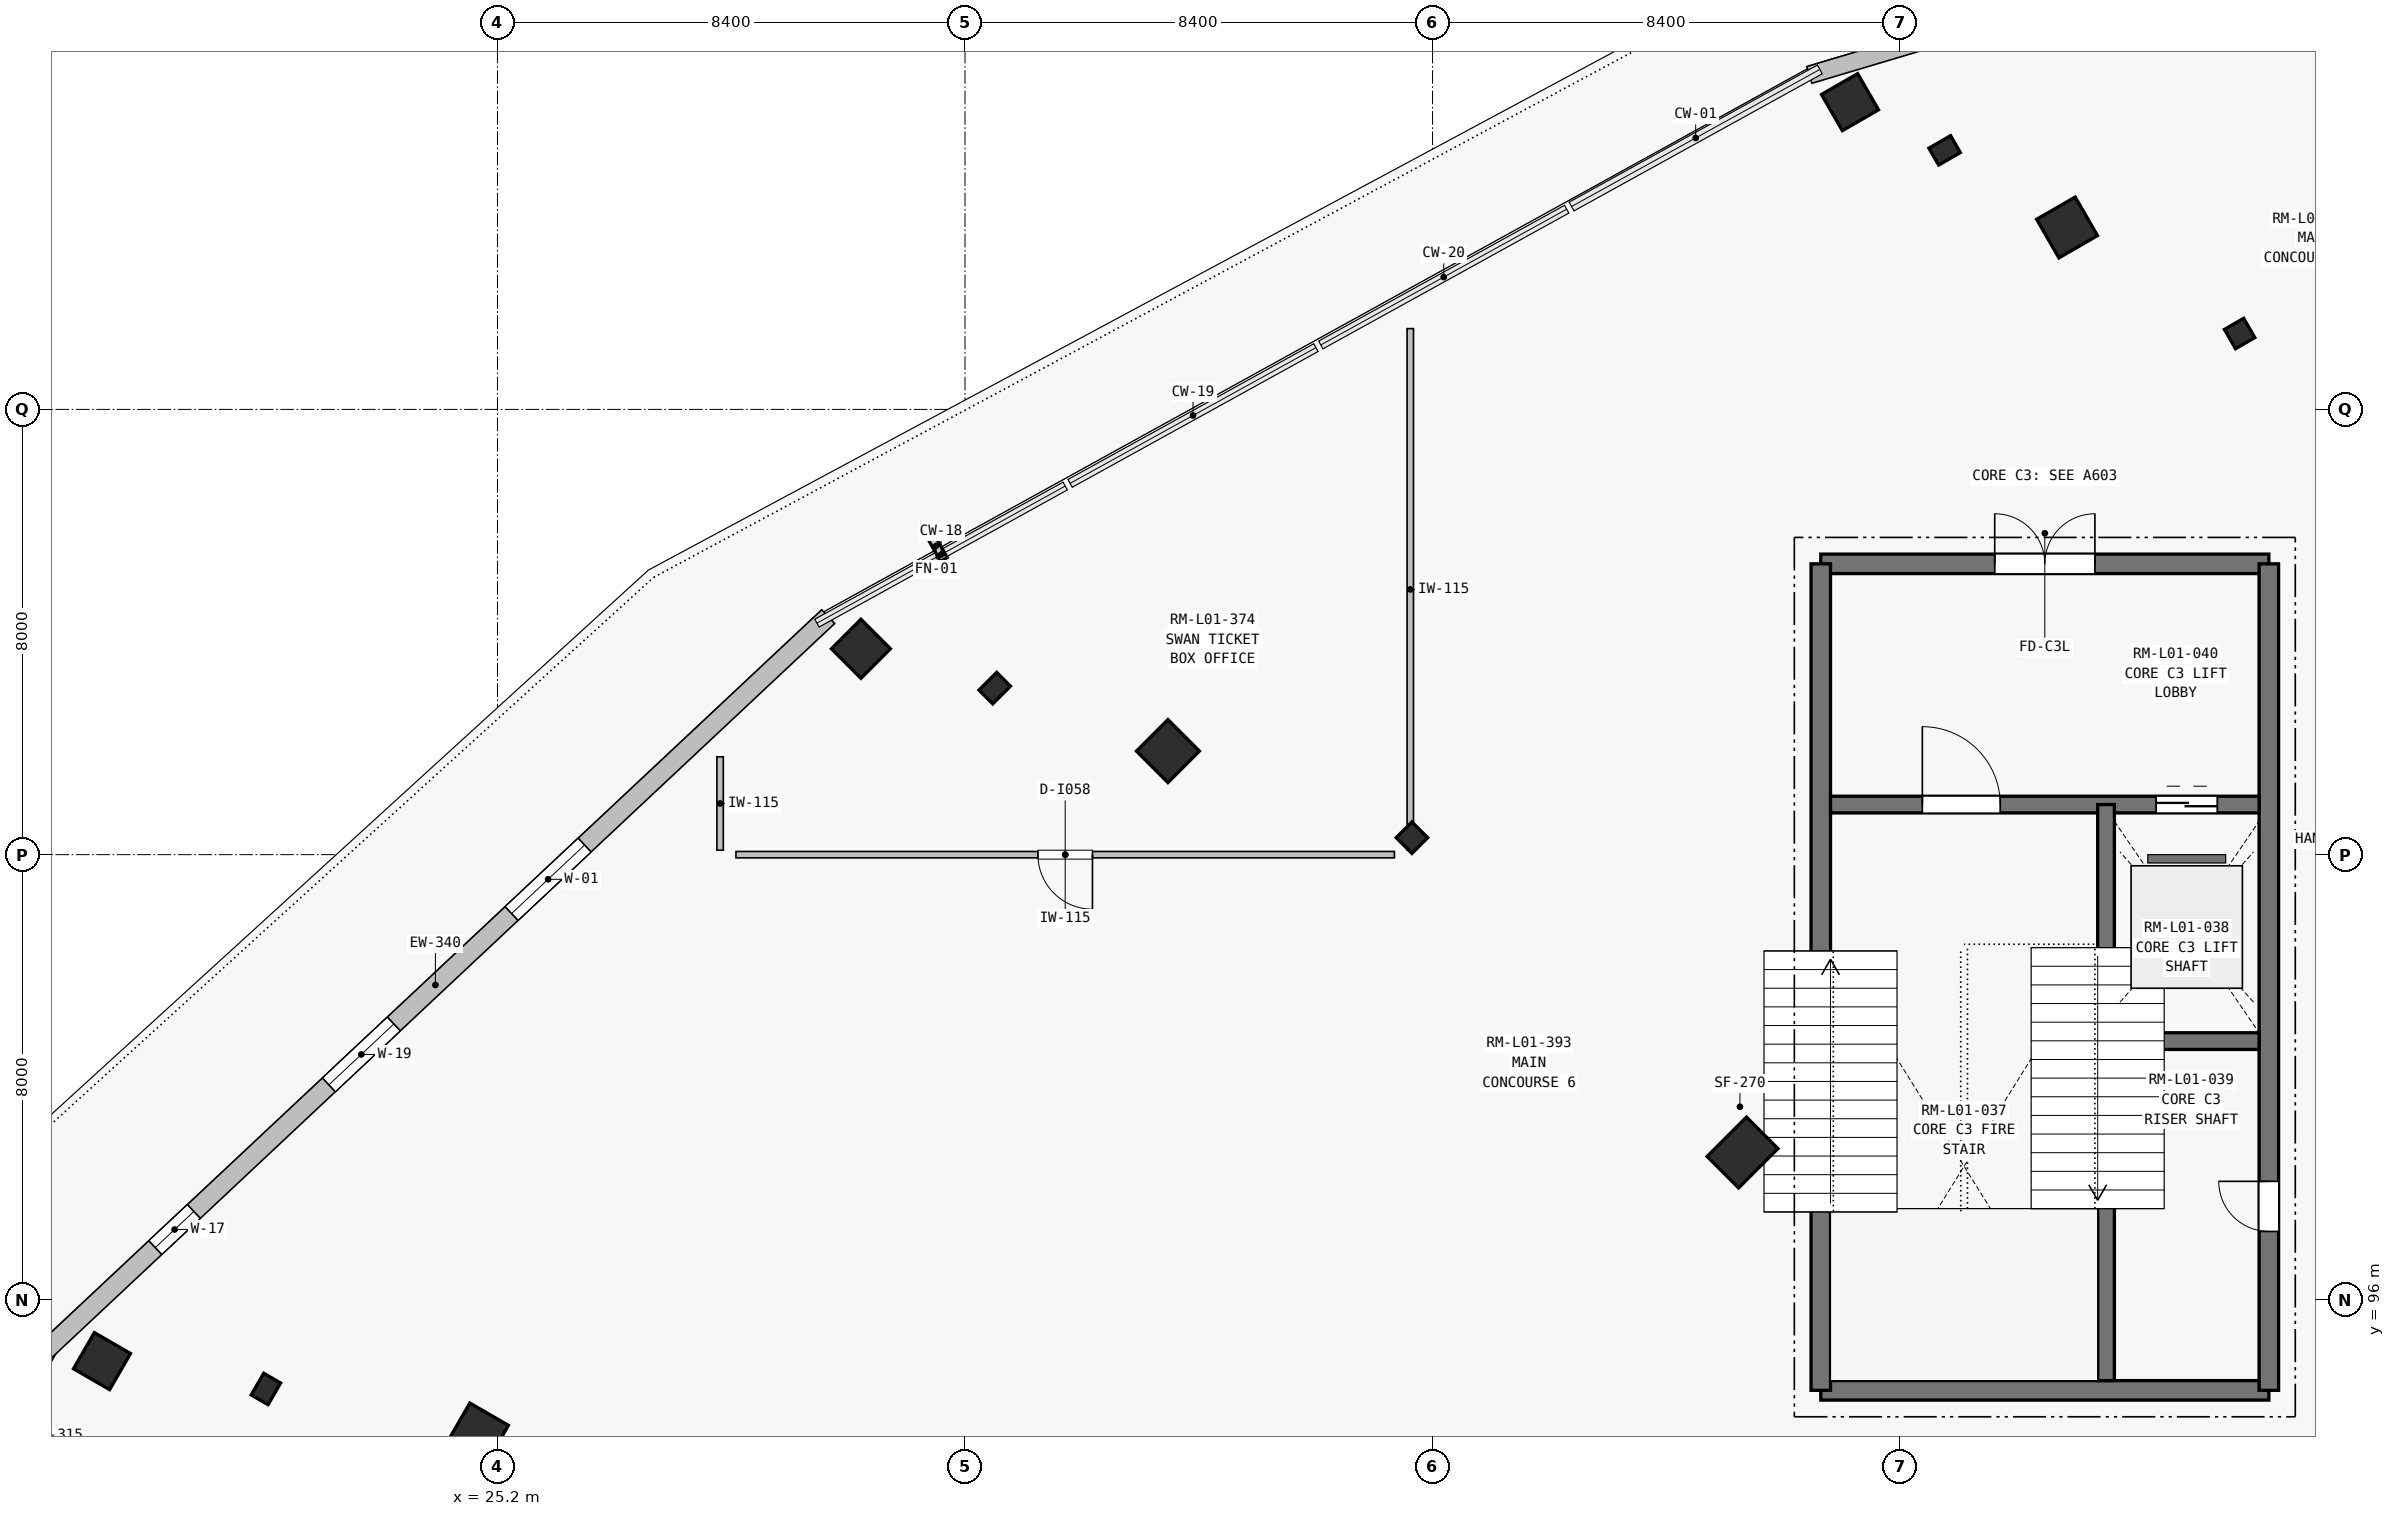
"""IFC4 building model, lengths in metres.
Left out: names, types, materials, properties, quantities, classifications, styles, units other than length and angle.
Written with IfcOpenShell. Run it as: python <this file> out.ifc"""

import sys

from ifc_helpers import new_model, si_unit, direction, frame, frame_2d, origin, origin_2d, place, context, subcontext, project, spatial, rectangle, i_section, extrude, element, fill, save


model = new_model("IFC4")
c1 = context("Model", 3, precision=1e-05, world=origin(), true_north=direction((0.0, 1.0)))
c2 = subcontext(c1, "Body", "Model", "MODEL_VIEW")
j1 = project(units=[si_unit("LENGTHUNIT", "METRE"), si_unit("PLANEANGLEUNIT", "RADIAN")], contexts=[c1])
p1 = place(None, origin())
s1 = spatial("IfcSite", under=j1, at=p1, CompositionType="ELEMENT")
p2 = place(p1, origin())
s2 = spatial("IfcBuilding", under=s1, at=p2, CompositionType="ELEMENT")
p3 = place(p2, frame((0.0, 0.0, 5.4)))
s3 = spatial("IfcBuildingStorey", under=s2, at=p3, CompositionType="ELEMENT", Elevation=5.4)
p4 = place(p3, frame((47.569, 98.648, 0.0), z_axis=(0.0, 0.0, 1.0), x_axis=(-0.707106781187, 0.707106781187, 0.0)))
e1 = element("IfcColumn", 1, at=p4, inside=s3, PredefinedType="COLUMN", context=c2, shape_type="SweptSolid", body=[
    extrude(rectangle(XDim=0.8, YDim=1.0, at=origin_2d()), origin(), (0.0, 0.0, 1.0), 4.5),
])
for number, where, z_axis, x_axis in (
    (2, (56.5, 113.363, 0.0), (0.0, 0.0, 1.0), (-0.5, 0.866, 0.0)),
    (3, (41.63, 104.305, 0.0), (0.0, 0.0, 1.0), (-0.707, 0.707, 0.0)),
):
    element("IfcColumn", number, at=place(p3, frame(where, z_axis=z_axis, x_axis=x_axis)), inside=s3, PredefinedType="COLUMN", context=c2, shape_type="SweptSolid", body=[
        extrude(i_section(OverallWidth=0.4, OverallDepth=0.4, WebThickness=0.018, FlangeThickness=0.032, at=origin_2d()), origin(), (0.0, 0.0, 1.0), 4.5),
    ])
for number, where, z_axis, x_axis in (
    (4, (53.4, 115.269, 0.0), (0.0, 0.0, 1.0), (-0.5, 0.866, 0.0)),
    (5, (37.246, 105.861, 0.0), (0.0, 0.0, 1.0), (-0.707, 0.707, 0.0)),
    (6, (24.85, 93.6, 0.0), (0.0, 0.0, 1.0), (-0.866, 0.5, 0.0)),
):
    element("IfcColumn", number, at=place(p3, frame(where, z_axis=z_axis, x_axis=x_axis)), inside=s3, PredefinedType="COLUMN", context=c2, shape_type="SweptSolid", body=[
        extrude(rectangle(XDim=0.8, YDim=0.8, at=origin_2d()), origin(), (0.0, 0.0, 1.0), 4.5),
    ])
for number, where, z_axis, x_axis in (
    (7, (49.5, 117.521, 0.0), (0.0, 0.0, 1.0), (-0.5, 0.866, 0.0)),
    (8, (31.73, 107.699, 0.0), (0.0, 0.0, 1.0), (-0.707, 0.707, 0.0)),
    (9, (18.095, 94.9, 0.0), (0.0, 0.0, 1.0), (-0.866, 0.5, 0.0)),
):
    element("IfcColumn", number, at=place(p3, frame(where, z_axis=z_axis, x_axis=x_axis)), inside=s3, PredefinedType="COLUMN", context=c2, shape_type="SweptSolid", body=[
        extrude(rectangle(XDim=0.75, YDim=0.75, at=origin_2d()), origin(), (0.0, 0.0, 1.0), 4.25),
    ])
for number, where, z_axis, x_axis in (
    (10, (51.2, 116.654, 0.0), (0.0, 0.0, 1.0), (-0.5, 0.866, 0.0)),
    (11, (34.134, 106.992, 0.0), (0.0, 0.0, 1.0), (-0.707, 0.707, 0.0)),
    (12, (21.04, 94.4, 0.0), (0.0, 0.0, 1.0), (-0.866, 0.5, 0.0)),
):
    element("IfcColumn", number, at=place(p3, frame(where, z_axis=z_axis, x_axis=x_axis)), inside=s3, PredefinedType="PILASTER", context=c2, shape_type="SweptSolid", body=[
        extrude(rectangle(XDim=0.35, YDim=0.45, at=origin_2d()), origin(), (0.0, 0.0, 1.0), 4.5),
    ])
p5 = place(p3, frame((15.201, 91.763, 0.0), z_axis=(0.0, 0.0, 1.0), x_axis=(0.498908523597, 0.866654651567, 0.0)))
e13 = element("IfcWall", 13, at=p5, inside=s3, PredefinedType="SOLIDWALL", context=c2, shape_type="SweptSolid", body=[
    extrude(rectangle(XDim=4.173, YDim=0.315, at=frame_2d((2.086, 0.0))), origin(), (0.0, 0.0, 1.0), 4.25),
])
p6 = place(p3, frame((17.028, 95.041, 0.0), z_axis=(0.0, 0.0, 1.0), x_axis=(0.729448660381, 0.684035563307, 0.0)))
e14 = element("IfcWall", 14, at=p6, inside=s3, PredefinedType="SOLIDWALL", context=c2, shape_type="SweptSolid", body=[
    extrude(rectangle(XDim=19.348, YDim=0.34, at=frame_2d((9.674, 0.0))), origin(), (0.0, 0.0, 1.0), 4.25),
])
p7 = place(p6, frame((2.775, 0.0, 0.75)))
e15 = element("IfcOpeningElement", 15, at=p7, cuts=e14, PredefinedType="OPENING", context=c2, shape_type="SweptSolid", body=[
    extrude(rectangle(XDim=0.95, YDim=2.2, at=frame_2d((0.475, 1.1))), frame((0.0, 0.18, 0.0), z_axis=(0.0, -1.0, 0.0), x_axis=(1.0, 0.0, 0.0)), (0.0, 0.0, 1.0), 0.36),
])
p8 = place(p6, frame((7.05, 0.0, 0.9)))
e16 = element("IfcOpeningElement", 16, at=p8, cuts=e14, PredefinedType="OPENING", context=c2, shape_type="SweptSolid", body=[
    extrude(rectangle(XDim=1.6, YDim=1.45, at=frame_2d((0.8, 0.725))), frame((0.0, 0.18, 0.0), z_axis=(0.0, -1.0, 0.0), x_axis=(1.0, 0.0, 0.0)), (0.0, 0.0, 1.0), 0.36),
])
p9 = place(p6, frame((11.55, 0.0, 0.75)))
e17 = element("IfcOpeningElement", 17, at=p9, cuts=e14, PredefinedType="OPENING", context=c2, shape_type="SweptSolid", body=[
    extrude(rectangle(XDim=1.8, YDim=2.4, at=frame_2d((0.9, 1.2))), frame((0.0, 0.18, 0.0), z_axis=(0.0, -1.0, 0.0), x_axis=(1.0, 0.0, 0.0)), (0.0, 0.0, 1.0), 0.36),
])
p10 = place(p3, frame((48.77, 118.01, 0.0), z_axis=(0.0, 0.0, 1.0), x_axis=(0.958340022304, 0.285629833265, 0.0)))
e18 = element("IfcWall", 18, at=p10, inside=s3, PredefinedType="SOLIDWALL", context=c2, shape_type="SweptSolid", body=[
    extrude(rectangle(XDim=22.26, YDim=0.315, at=frame_2d((11.13, 0.0))), origin(), (0.0, 0.0, 1.0), 4.25),
])
p11 = place(p10, frame((2.525, 0.0, 0.9)))
e19 = element("IfcOpeningElement", 19, at=p11, cuts=e18, PredefinedType="OPENING", context=c2, shape_type="SweptSolid", body=[
    extrude(rectangle(XDim=1.45, YDim=1.4, at=frame_2d((0.725, 0.7))), frame((0.0, 0.167, 0.0), z_axis=(0.0, -1.0, 0.0), x_axis=(1.0, 0.0, 0.0)), (0.0, 0.0, 1.0), 0.335),
])
p12 = place(p10, frame((7.025, 0.0, 0.75)))
e20 = element("IfcOpeningElement", 20, at=p12, cuts=e18, PredefinedType="OPENING", context=c2, shape_type="SweptSolid", body=[
    extrude(rectangle(XDim=1.65, YDim=2.4, at=frame_2d((0.825, 1.2))), frame((0.0, 0.167, 0.0), z_axis=(0.0, -1.0, 0.0), x_axis=(1.0, 0.0, 0.0)), (0.0, 0.0, 1.0), 0.335),
])
p13 = place(p10, frame((11.775, 0.0, 0.75)))
e21 = element("IfcOpeningElement", 21, at=p13, cuts=e18, PredefinedType="OPENING", context=c2, shape_type="SweptSolid", body=[
    extrude(rectangle(XDim=1.35, YDim=2.3, at=frame_2d((0.675, 1.15))), frame((0.0, 0.167, 0.0), z_axis=(0.0, -1.0, 0.0), x_axis=(1.0, 0.0, 0.0)), (0.0, 0.0, 1.0), 0.335),
])
p14 = place(p10, frame((15.85, 0.0, 0.9)))
e22 = element("IfcOpeningElement", 22, at=p14, cuts=e18, PredefinedType="OPENING", context=c2, shape_type="SweptSolid", body=[
    extrude(rectangle(XDim=2.4, YDim=2.1, at=frame_2d((1.2, 1.05))), frame((0.0, 0.167, 0.0), z_axis=(0.0, -1.0, 0.0), x_axis=(1.0, 0.0, 0.0)), (0.0, 0.0, 1.0), 0.335),
])
p15 = place(p3, frame((48.975, 94.375, 0.0), z_axis=(0.0, 0.0, 1.0), x_axis=(1.0, 0.0, 0.0)))
e23 = element("IfcWall", 23, at=p15, inside=s3, PredefinedType="SHEAR", context=c2, shape_type="SweptSolid", body=[
    extrude(rectangle(XDim=8.05, YDim=0.35, at=frame_2d((4.025, 0.0))), origin(), (0.0, 0.0, 1.0), 4.5),
])
p16 = place(p3, frame((48.975, 109.225, 0.0), z_axis=(0.0, 0.0, 1.0), x_axis=(1.0, 0.0, 0.0)))
e24 = element("IfcWall", 24, at=p16, inside=s3, PredefinedType="SHEAR", context=c2, shape_type="SweptSolid", body=[
    extrude(rectangle(XDim=8.05, YDim=0.35, at=frame_2d((4.025, 0.0))), origin(), (0.0, 0.0, 1.0), 4.5),
])
p17 = place(p16, frame((3.125, 0.0, 0.0)))
e25 = element("IfcOpeningElement", 25, at=p17, cuts=e24, PredefinedType="OPENING", context=c2, shape_type="SweptSolid", body=[
    extrude(rectangle(XDim=1.8, YDim=2.25, at=frame_2d((0.9, 1.125))), frame((0.0, 0.185, 0.0), z_axis=(0.0, -1.0, 0.0), x_axis=(1.0, 0.0, 0.0)), (0.0, 0.0, 1.0), 0.37),
])
p18 = place(p3, frame((48.975, 94.375, 0.0), z_axis=(0.0, 0.0, 1.0), x_axis=(0.0, 1.0, 0.0)))
e26 = element("IfcWall", 26, at=p18, inside=s3, PredefinedType="SHEAR", context=c2, shape_type="SweptSolid", body=[
    extrude(rectangle(XDim=14.85, YDim=0.35, at=frame_2d((7.425, 0.0))), origin(), (0.0, 0.0, 1.0), 4.5),
])
p19 = place(p3, frame((57.025, 94.375, 0.0), z_axis=(0.0, 0.0, 1.0), x_axis=(0.0, 1.0, 0.0)))
e27 = element("IfcWall", 27, at=p19, inside=s3, PredefinedType="SHEAR", context=c2, shape_type="SweptSolid", body=[
    extrude(rectangle(XDim=14.85, YDim=0.35, at=frame_2d((7.425, 0.0))), origin(), (0.0, 0.0, 1.0), 4.5),
])
p20 = place(p19, frame((2.855, 0.0, 0.0)))
e28 = element("IfcOpeningElement", 28, at=p20, cuts=e27, PredefinedType="OPENING", context=c2, shape_type="SweptSolid", body=[
    extrude(rectangle(XDim=0.9, YDim=2.1, at=frame_2d((0.45, 1.05))), frame((0.0, 0.185, 0.0), z_axis=(0.0, -1.0, 0.0), x_axis=(1.0, 0.0, 0.0)), (0.0, 0.0, 1.0), 0.37),
])
p21 = place(p3, frame((49.15, 104.9, 0.0), z_axis=(0.0, 0.0, 1.0), x_axis=(1.0, 0.0, 0.0)))
e29 = element("IfcWall", 29, at=p21, inside=s3, PredefinedType="SHEAR", context=c2, shape_type="SweptSolid", body=[
    extrude(rectangle(XDim=7.7, YDim=0.3, at=frame_2d((3.85, 0.0))), origin(), (0.0, 0.0, 1.0), 4.5),
])
p22 = place(p21, frame((1.65, 0.0, 0.0)))
e30 = element("IfcOpeningElement", 30, at=p22, cuts=e29, PredefinedType="OPENING", context=c2, shape_type="SweptSolid", body=[
    extrude(rectangle(XDim=1.4, YDim=2.2, at=frame_2d((0.7, 1.1))), frame((0.0, 0.16, 0.0), z_axis=(0.0, -1.0, 0.0), x_axis=(1.0, 0.0, 0.0)), (0.0, 0.0, 1.0), 0.32),
])
p23 = place(p21, frame((5.85, 0.0, 0.0)))
e31 = element("IfcOpeningElement", 31, at=p23, cuts=e29, PredefinedType="OPENING", context=c2, shape_type="SweptSolid", body=[
    extrude(rectangle(XDim=1.1, YDim=2.2, at=frame_2d((0.55, 1.1))), frame((0.0, 0.16, 0.0), z_axis=(0.0, -1.0, 0.0), x_axis=(1.0, 0.0, 0.0)), (0.0, 0.0, 1.0), 0.32),
])
p24 = place(p3, frame((54.1, 94.55, 0.0), z_axis=(0.0, 0.0, 1.0), x_axis=(0.0, 1.0, 0.0)))
e32 = element("IfcWall", 32, at=p24, inside=s3, PredefinedType="SHEAR", context=c2, shape_type="SweptSolid", body=[
    extrude(rectangle(XDim=10.35, YDim=0.3, at=frame_2d((5.175, 0.0))), origin(), (0.0, 0.0, 1.0), 4.5),
])
p25 = place(p3, frame((54.25, 100.65, 0.0), z_axis=(0.0, 0.0, 1.0), x_axis=(1.0, 0.0, 0.0)))
e33 = element("IfcWall", 33, at=p25, inside=s3, PredefinedType="SHEAR", context=c2, shape_type="SweptSolid", body=[
    extrude(rectangle(XDim=2.6, YDim=0.3, at=frame_2d((1.3, 0.0))), origin(), (0.0, 0.0, 1.0), 4.5),
])
p26 = place(p3, frame((29.2, 104.08, 0.0), z_axis=(0.0, 0.0, 1.0), x_axis=(0.0, 1.0, 0.0)))
e34 = element("IfcWall", 34, at=p26, inside=s3, PredefinedType="PARTITIONING", context=c2, shape_type="SweptSolid", body=[
    extrude(rectangle(XDim=1.678, YDim=0.115, at=frame_2d((0.839, 0.0))), origin(), (0.0, 0.0, 1.0), 4.25),
])
p27 = place(p3, frame((41.6, 113.452, 0.0), z_axis=(0.0, 0.0, 1.0), x_axis=(0.0, -1.0, 0.0)))
e35 = element("IfcWall", 35, at=p27, inside=s3, PredefinedType="PARTITIONING", context=c2, shape_type="SweptSolid", body=[
    extrude(rectangle(XDim=9.372, YDim=0.115, at=frame_2d((4.686, 0.0))), origin(), (0.0, 0.0, 1.0), 3.505),
])
p28 = place(p3, frame((41.315, 104.0, 0.0), z_axis=(0.0, 0.0, 1.0), x_axis=(-1.0, 0.0, 0.0)))
e36 = element("IfcWall", 36, at=p28, inside=s3, PredefinedType="PARTITIONING", context=c2, shape_type="SweptSolid", body=[
    extrude(rectangle(XDim=11.83, YDim=0.115, at=frame_2d((5.915, 0.0))), origin(), (0.0, 0.0, 1.0), 3.505),
])
p29 = place(p28, frame((5.425, 0.0, 0.0)))
e37 = element("IfcOpeningElement", 37, at=p29, cuts=e36, PredefinedType="OPENING", context=c2, shape_type="SweptSolid", body=[
    extrude(rectangle(XDim=0.98, YDim=2.15, at=frame_2d((0.49, 1.075))), frame((0.0, 0.067, 0.0), z_axis=(0.0, -1.0, 0.0), x_axis=(1.0, 0.0, 0.0)), (0.0, 0.0, 1.0), 0.135),
])
p30 = place(p7, origin())
e38 = element("IfcWindow", 38, at=p30, inside=s3, PartitioningType="SINGLE_PANEL", PredefinedType="WINDOW", context=c2, shape_type="SweptSolid", body=[
    extrude(rectangle(XDim=0.95, YDim=2.2, at=frame_2d((0.475, 1.1))), frame((0.0, 0.03, 0.0), z_axis=(0.0, -1.0, 0.0), x_axis=(1.0, 0.0, 0.0)), (0.0, 0.0, 1.0), 0.06),
])
fill(e15, e38)
p31 = place(p8, origin())
e39 = element("IfcWindow", 39, at=p31, inside=s3, PartitioningType="SINGLE_PANEL", PredefinedType="WINDOW", context=c2, shape_type="SweptSolid", body=[
    extrude(rectangle(XDim=1.6, YDim=1.45, at=frame_2d((0.8, 0.725))), frame((0.0, 0.03, 0.0), z_axis=(0.0, -1.0, 0.0), x_axis=(1.0, 0.0, 0.0)), (0.0, 0.0, 1.0), 0.06),
])
fill(e16, e39)
p32 = place(p9, origin())
e40 = element("IfcWindow", 40, at=p32, inside=s3, PartitioningType="SINGLE_PANEL", PredefinedType="WINDOW", context=c2, shape_type="SweptSolid", body=[
    extrude(rectangle(XDim=1.8, YDim=2.4, at=frame_2d((0.9, 1.2))), frame((0.0, 0.03, 0.0), z_axis=(0.0, -1.0, 0.0), x_axis=(1.0, 0.0, 0.0)), (0.0, 0.0, 1.0), 0.06),
])
fill(e17, e40)
p33 = place(p17, origin())
e41 = element("IfcDoor", 41, at=p33, inside=s3, OperationType="DOUBLE_DOOR_SINGLE_SWING", PredefinedType="DOOR", context=c2, shape_type="SweptSolid", body=[
    extrude(rectangle(XDim=1.8, YDim=2.25, at=frame_2d((0.9, 1.125))), frame((0.0, 0.025, 0.0), z_axis=(0.0, -1.0, 0.0), x_axis=(1.0, 0.0, 0.0)), (0.0, 0.0, 1.0), 0.05),
])
fill(e25, e41)
p34 = place(p22, origin())
e42 = element("IfcDoor", 42, at=p34, inside=s3, OperationType="SINGLE_SWING_LEFT", PredefinedType="DOOR", context=c2, shape_type="SweptSolid", body=[
    extrude(rectangle(XDim=1.4, YDim=2.2, at=frame_2d((0.7, 1.1))), frame((0.0, 0.025, 0.0), z_axis=(0.0, -1.0, 0.0), x_axis=(1.0, 0.0, 0.0)), (0.0, 0.0, 1.0), 0.05),
])
fill(e30, e42)
p35 = place(p20, origin())
e43 = element("IfcDoor", 43, at=p35, inside=s3, OperationType="SINGLE_SWING_RIGHT", PredefinedType="DOOR", context=c2, shape_type="SweptSolid", body=[
    extrude(rectangle(XDim=0.9, YDim=2.1, at=frame_2d((0.45, 1.05))), frame((0.0, 0.025, 0.0), z_axis=(0.0, -1.0, 0.0), x_axis=(1.0, 0.0, 0.0)), (0.0, 0.0, 1.0), 0.05),
])
fill(e28, e43)
p36 = place(p23, origin())
e44 = element("IfcDoor", 44, at=p36, inside=s3, OperationType="SLIDING_TO_LEFT", PredefinedType="DOOR", context=c2, shape_type="SweptSolid", body=[
    extrude(rectangle(XDim=1.1, YDim=2.2, at=frame_2d((0.55, 1.1))), frame((0.0, 0.025, 0.0), z_axis=(0.0, -1.0, 0.0), x_axis=(1.0, 0.0, 0.0)), (0.0, 0.0, 1.0), 0.05),
])
fill(e31, e44)
p37 = place(p29, origin())
e45 = element("IfcDoor", 45, at=p37, inside=s3, OperationType="SINGLE_SWING_LEFT", PredefinedType="DOOR", context=c2, shape_type="SweptSolid", body=[
    extrude(rectangle(XDim=0.98, YDim=2.15, at=frame_2d((0.49, 1.075))), frame((0.0, 0.025, 0.0), z_axis=(0.0, -1.0, 0.0), x_axis=(1.0, 0.0, 0.0)), (0.0, 0.0, 1.0), 0.05),
])
fill(e37, e45)
save(model, sys.argv[1])
